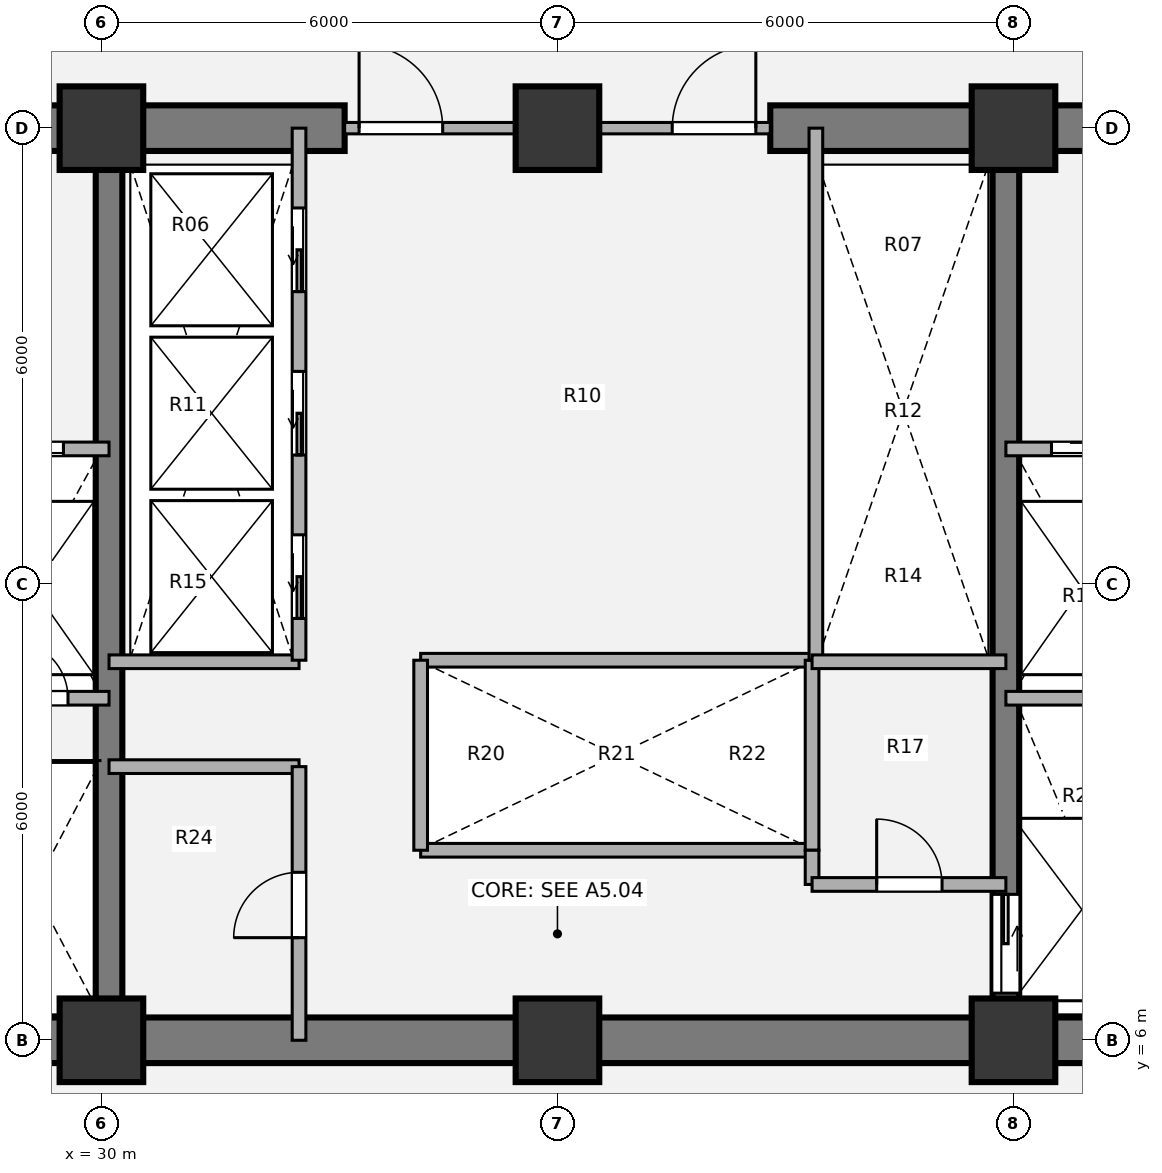
"""IFC4 building model, lengths in metres.
Left out: names, types, materials, properties, quantities, classifications, styles, units other than length and angle.
Written with IfcOpenShell. Run it as: python <this file> out.ifc"""

import sys

from ifc_helpers import new_model, si_unit, direction, frame, frame_2d, origin, origin_2d, place, context, subcontext, project, spatial, rectangle, extrude, source, transform, mapped, element, fill, save


model = new_model("IFC4")
c1 = context("Model", 3, precision=1e-05, world=origin(), true_north=direction((0.0, 1.0)))
c2 = subcontext(c1, "Body", "Model", "MODEL_VIEW")
j1 = project(units=[si_unit("LENGTHUNIT", "METRE"), si_unit("PLANEANGLEUNIT", "RADIAN")], contexts=[c1])
p1 = place(None, origin())
s1 = spatial("IfcSite", under=j1, at=p1, CompositionType="ELEMENT")
p2 = place(p1, origin())
s2 = spatial("IfcBuilding", under=s1, at=p2, CompositionType="ELEMENT")
p3 = place(p2, frame((0.0, 0.0, 57.24)))
s3 = spatial("IfcBuildingStorey", under=s2, at=p3, CompositionType="ELEMENT", Elevation=57.24)
m1 = source(origin(), c2, "Body", "SweptSolid", [
    extrude(rectangle(XDim=1.1, YDim=1.1, at=origin_2d()), origin(), (0.0, 0.0, 1.0), 3.78),
])
for number, where, z_axis, x_axis in (
    (1, (30.0, 6.0, 0.0), (0.0, 0.0, 1.0), (1.0, 0.0, 0.0)),
    (2, (36.0, 6.0, 0.0), (0.0, 0.0, 1.0), (1.0, 0.0, 0.0)),
    (3, (42.0, 6.0, 0.0), (0.0, 0.0, 1.0), (1.0, 0.0, 0.0)),
    (4, (30.0, 18.0, 0.0), (0.0, 0.0, 1.0), (1.0, 0.0, 0.0)),
    (5, (36.0, 18.0, 0.0), (0.0, 0.0, 1.0), (1.0, 0.0, 0.0)),
    (6, (42.0, 18.0, 0.0), (0.0, 0.0, 1.0), (1.0, 0.0, 0.0)),
):
    element("IfcColumn", number, at=place(p3, frame(where, z_axis=z_axis, x_axis=x_axis)), inside=s3, PredefinedType="COLUMN", context=c2, shape_type="MappedRepresentation", body=[
        mapped(m1, transform((0.0, 0.0, 0.0), x_axis=(1.0, 0.0, 0.0), y_axis=(0.0, 1.0, 0.0), z_axis=(0.0, 0.0, 1.0), scale=1.0)),
    ])
p4 = place(p3, frame((48.3, 6.0, 0.0), z_axis=(0.0, 0.0, 1.0), x_axis=(-1.0, 0.0, 0.0)))
e7 = element("IfcWall", 7, at=p4, inside=s3, PredefinedType="SHEAR", context=c2, shape_type="SweptSolid", body=[
    extrude(rectangle(XDim=24.6, YDim=0.6, at=frame_2d((12.3, 0.0))), origin(), (0.0, 0.0, 1.0), 3.78),
])
p5 = place(p3, frame((23.7, 18.0, 0.0), z_axis=(0.0, 0.0, 1.0), x_axis=(1.0, 0.0, 0.0)))
e8 = element("IfcWall", 8, at=p5, inside=s3, PredefinedType="SHEAR", context=c2, shape_type="SweptSolid", body=[
    extrude(rectangle(XDim=9.5, YDim=0.6, at=frame_2d((4.75, 0.0))), origin(), (0.0, 0.0, 1.0), 3.78),
])
p6 = place(p5, frame((2.95, 0.0, 0.0)))
e9 = element("IfcOpeningElement", 9, at=p6, cuts=e8, PredefinedType="OPENING", context=c2, shape_type="SweptSolid", body=[
    extrude(rectangle(XDim=1.1, YDim=2.1, at=origin_2d()), frame((0.55, 0.31, 1.05), z_axis=(0.0, -1.0, 0.0), x_axis=(1.0, 0.0, 0.0)), (0.0, 0.0, 1.0), 0.62),
])
p7 = place(p3, frame((38.8, 18.0, 0.0), z_axis=(0.0, 0.0, 1.0), x_axis=(1.0, 0.0, 0.0)))
e10 = element("IfcWall", 10, at=p7, inside=s3, PredefinedType="SHEAR", context=c2, shape_type="SweptSolid", body=[
    extrude(rectangle(XDim=9.5, YDim=0.6, at=frame_2d((4.75, 0.0))), origin(), (0.0, 0.0, 1.0), 3.78),
])
p8 = place(p7, frame((5.45, 0.0, 0.0)))
e11 = element("IfcOpeningElement", 11, at=p8, cuts=e10, PredefinedType="OPENING", context=c2, shape_type="SweptSolid", body=[
    extrude(rectangle(XDim=1.1, YDim=2.1, at=origin_2d()), frame((0.55, 0.31, 1.05), z_axis=(0.0, -1.0, 0.0), x_axis=(1.0, 0.0, 0.0)), (0.0, 0.0, 1.0), 0.62),
])
p9 = place(p3, frame((30.1, 6.0, 0.0), z_axis=(0.0, 0.0, 1.0), x_axis=(0.0, 1.0, 0.0)))
e12 = element("IfcWall", 12, at=p9, inside=s3, PredefinedType="SHEAR", context=c2, shape_type="SweptSolid", body=[
    extrude(rectangle(XDim=12.0, YDim=0.35, at=frame_2d((6.0, 0.0))), origin(), (0.0, 0.0, 1.0), 3.78),
])
p10 = place(p3, frame((41.9, 18.0, 0.0), z_axis=(0.0, 0.0, 1.0), x_axis=(0.0, -1.0, 0.0)))
e13 = element("IfcWall", 13, at=p10, inside=s3, PredefinedType="SHEAR", context=c2, shape_type="SweptSolid", body=[
    extrude(rectangle(XDim=12.0, YDim=0.35, at=frame_2d((6.0, 0.0))), origin(), (0.0, 0.0, 1.0), 3.78),
])
p11 = place(p10, frame((10.08, 0.0, 0.0)))
e14 = element("IfcOpeningElement", 14, at=p11, cuts=e13, PredefinedType="OPENING", context=c2, shape_type="SweptSolid", body=[
    extrude(rectangle(XDim=1.3, YDim=2.1, at=origin_2d()), frame((0.65, 0.185, 1.05), z_axis=(0.0, -1.0, 0.0), x_axis=(1.0, 0.0, 0.0)), (0.0, 0.0, 1.0), 0.37),
])
for number, where, z_axis, x_axis in (
    (15, (34.2, 11.0, 0.0), (0.0, 0.0, 1.0), (1.0, 0.0, 0.0)),
    (16, (34.2, 8.5, 0.0), (0.0, 0.0, 1.0), (1.0, 0.0, 0.0)),
):
    element("IfcWall", number, at=place(p3, frame(where, z_axis=z_axis, x_axis=x_axis)), inside=s3, PredefinedType="PARTITIONING", context=c2, shape_type="SweptSolid", body=[
        extrude(rectangle(XDim=5.15, YDim=0.18, at=frame_2d((2.575, 0.0))), origin(), (0.0, 0.0, 1.0), 3.5),
    ])
for number, where, z_axis, x_axis in (
    (17, (34.2, 8.5, 0.0), (0.0, 0.0, 1.0), (0.0, 1.0, 0.0)),
    (18, (39.35, 8.5, 0.0), (0.0, 0.0, 1.0), (0.0, 1.0, 0.0)),
):
    element("IfcWall", number, at=place(p3, frame(where, z_axis=z_axis, x_axis=x_axis)), inside=s3, PredefinedType="PARTITIONING", context=c2, shape_type="SweptSolid", body=[
        extrude(rectangle(XDim=2.5, YDim=0.18, at=frame_2d((1.25, 0.0))), origin(), (0.0, 0.0, 1.0), 3.5),
    ])
p12 = place(p3, frame((39.4, 11.0, 0.0), z_axis=(0.0, 0.0, 1.0), x_axis=(0.0, 1.0, 0.0)))
e19 = element("IfcWall", 19, at=p12, inside=s3, PredefinedType="PARTITIONING", context=c2, shape_type="SweptSolid", body=[
    extrude(rectangle(XDim=7.0, YDim=0.18, at=frame_2d((3.5, 0.0))), origin(), (0.0, 0.0, 1.0), 3.5),
])
for number, where, z_axis, x_axis in (
    (20, (30.1, 10.98, 0.0), (0.0, 0.0, 1.0), (1.0, 0.0, 0.0)),
    (21, (30.1, 9.6, 0.0), (0.0, 0.0, 1.0), (1.0, 0.0, 0.0)),
):
    element("IfcWall", number, at=place(p3, frame(where, z_axis=z_axis, x_axis=x_axis)), inside=s3, PredefinedType="PARTITIONING", context=c2, shape_type="SweptSolid", body=[
        extrude(rectangle(XDim=2.5, YDim=0.18, at=frame_2d((1.25, 0.0))), origin(), (0.0, 0.0, 1.0), 3.5),
    ])
p13 = place(p3, frame((32.6, 6.0, 0.0), z_axis=(0.0, 0.0, 1.0), x_axis=(0.0, 1.0, 0.0)))
e22 = element("IfcWall", 22, at=p13, inside=s3, PredefinedType="PARTITIONING", context=c2, shape_type="SweptSolid", body=[
    extrude(rectangle(XDim=3.6, YDim=0.18, at=frame_2d((1.8, 0.0))), origin(), (0.0, 0.0, 1.0), 3.5),
])
p14 = place(p13, frame((1.35, 0.0, 0.0)))
e23 = element("IfcOpeningElement", 23, at=p14, cuts=e22, PredefinedType="OPENING", context=c2, shape_type="SweptSolid", body=[
    extrude(rectangle(XDim=0.86, YDim=2.1, at=origin_2d()), frame((0.43, 0.1, 1.05), z_axis=(0.0, -1.0, 0.0), x_axis=(1.0, 0.0, 0.0)), (0.0, 0.0, 1.0), 0.2),
])
p15 = place(p3, frame((39.35, 10.98, 0.0), z_axis=(0.0, 0.0, 1.0), x_axis=(1.0, 0.0, 0.0)))
e24 = element("IfcWall", 24, at=p15, inside=s3, PredefinedType="PARTITIONING", context=c2, shape_type="SweptSolid", body=[
    extrude(rectangle(XDim=2.55, YDim=0.18, at=frame_2d((1.275, 0.0))), origin(), (0.0, 0.0, 1.0), 3.5),
])
p16 = place(p3, frame((39.35, 8.05, 0.0), z_axis=(0.0, 0.0, 1.0), x_axis=(0.0, 1.0, 0.0)))
e25 = element("IfcWall", 25, at=p16, inside=s3, PredefinedType="PARTITIONING", context=c2, shape_type="SweptSolid", body=[
    extrude(rectangle(XDim=0.45, YDim=0.18, at=frame_2d((0.225, 0.0))), origin(), (0.0, 0.0, 1.0), 3.5),
])
p17 = place(p3, frame((39.35, 8.05, 0.0), z_axis=(0.0, 0.0, 1.0), x_axis=(1.0, 0.0, 0.0)))
e26 = element("IfcWall", 26, at=p17, inside=s3, PredefinedType="PARTITIONING", context=c2, shape_type="SweptSolid", body=[
    extrude(rectangle(XDim=2.55, YDim=0.18, at=frame_2d((1.275, 0.0))), origin(), (0.0, 0.0, 1.0), 3.5),
])
p18 = place(p17, frame((0.85, 0.0, 0.0)))
e27 = element("IfcOpeningElement", 27, at=p18, cuts=e26, PredefinedType="OPENING", context=c2, shape_type="SweptSolid", body=[
    extrude(rectangle(XDim=0.86, YDim=2.1, at=origin_2d()), frame((0.43, 0.1, 1.05), z_axis=(0.0, -1.0, 0.0), x_axis=(1.0, 0.0, 0.0)), (0.0, 0.0, 1.0), 0.2),
])
p19 = place(p3, frame((33.2, 18.0, 0.0), z_axis=(0.0, 0.0, 1.0), x_axis=(1.0, 0.0, 0.0)))
e28 = element("IfcWall", 28, at=p19, inside=s3, PredefinedType="PARTITIONING", context=c2, shape_type="SweptSolid", body=[
    extrude(rectangle(XDim=5.6, YDim=0.15, at=frame_2d((2.8, 0.0))), origin(), (0.0, 0.0, 1.0), 2.315),
])
p20 = place(p19, frame((0.19, 0.0, 0.0)))
e29 = element("IfcOpeningElement", 29, at=p20, cuts=e28, PredefinedType="OPENING", context=c2, shape_type="SweptSolid", body=[
    extrude(rectangle(XDim=1.1, YDim=2.1, at=origin_2d()), frame((0.55, 0.085, 1.05), z_axis=(0.0, -1.0, 0.0), x_axis=(1.0, 0.0, 0.0)), (0.0, 0.0, 1.0), 0.17),
])
p21 = place(p19, frame((4.31, 0.0, 0.0)))
e30 = element("IfcOpeningElement", 30, at=p21, cuts=e28, PredefinedType="OPENING", context=c2, shape_type="SweptSolid", body=[
    extrude(rectangle(XDim=1.1, YDim=2.1, at=origin_2d()), frame((0.55, 0.085, 1.05), z_axis=(0.0, -1.0, 0.0), x_axis=(1.0, 0.0, 0.0)), (0.0, 0.0, 1.0), 0.17),
])
p22 = place(p3, frame((24.0, 13.78, 0.0), z_axis=(0.0, 0.0, 1.0), x_axis=(1.0, 0.0, 0.0)))
e31 = element("IfcWall", 31, at=p22, inside=s3, PredefinedType="PARTITIONING", context=c2, shape_type="SweptSolid", body=[
    extrude(rectangle(XDim=6.1, YDim=0.18, at=frame_2d((3.05, 0.0))), origin(), (0.0, 0.0, 1.0), 3.5),
])
p23 = place(p22, frame((1.15, 0.0, 0.0)))
e32 = element("IfcOpeningElement", 32, at=p23, cuts=e31, PredefinedType="OPENING", context=c2, shape_type="SweptSolid", body=[
    extrude(rectangle(XDim=1.1, YDim=2.1, at=origin_2d()), frame((0.55, 0.1, 1.05), z_axis=(0.0, -1.0, 0.0), x_axis=(1.0, 0.0, 0.0)), (0.0, 0.0, 1.0), 0.2),
])
p24 = place(p22, frame((4.4, 0.0, 0.0)))
e33 = element("IfcOpeningElement", 33, at=p24, cuts=e31, PredefinedType="OPENING", context=c2, shape_type="SweptSolid", body=[
    extrude(rectangle(XDim=1.1, YDim=2.1, at=origin_2d()), frame((0.55, 0.1, 1.05), z_axis=(0.0, -1.0, 0.0), x_axis=(1.0, 0.0, 0.0)), (0.0, 0.0, 1.0), 0.2),
])
p25 = place(p3, frame((28.15, 10.5, 0.0), z_axis=(0.0, 0.0, 1.0), x_axis=(1.0, 0.0, 0.0)))
e34 = element("IfcWall", 34, at=p25, inside=s3, PredefinedType="PARTITIONING", context=c2, shape_type="SweptSolid", body=[
    extrude(rectangle(XDim=1.95, YDim=0.18, at=frame_2d((0.975, 0.0))), origin(), (0.0, 0.0, 1.0), 3.5),
])
p26 = place(p25, frame((0.65, 0.0, 0.0)))
e35 = element("IfcOpeningElement", 35, at=p26, cuts=e34, PredefinedType="OPENING", context=c2, shape_type="SweptSolid", body=[
    extrude(rectangle(XDim=0.76, YDim=2.05, at=origin_2d()), frame((0.38, 0.1, 1.025), z_axis=(0.0, -1.0, 0.0), x_axis=(1.0, 0.0, 0.0)), (0.0, 0.0, 1.0), 0.2),
])
p27 = place(p3, frame((41.9, 13.78, 0.0), z_axis=(0.0, 0.0, 1.0), x_axis=(1.0, 0.0, 0.0)))
e36 = element("IfcWall", 36, at=p27, inside=s3, PredefinedType="PARTITIONING", context=c2, shape_type="SweptSolid", body=[
    extrude(rectangle(XDim=6.1, YDim=0.18, at=frame_2d((3.05, 0.0))), origin(), (0.0, 0.0, 1.0), 3.5),
])
p28 = place(p27, frame((0.6, 0.0, 0.0)))
e37 = element("IfcOpeningElement", 37, at=p28, cuts=e36, PredefinedType="OPENING", context=c2, shape_type="SweptSolid", body=[
    extrude(rectangle(XDim=1.1, YDim=2.1, at=origin_2d()), frame((0.55, 0.1, 1.05), z_axis=(0.0, -1.0, 0.0), x_axis=(1.0, 0.0, 0.0)), (0.0, 0.0, 1.0), 0.2),
])
p29 = place(p27, frame((3.8, 0.0, 0.0)))
e38 = element("IfcOpeningElement", 38, at=p29, cuts=e36, PredefinedType="OPENING", context=c2, shape_type="SweptSolid", body=[
    extrude(rectangle(XDim=1.1, YDim=2.1, at=origin_2d()), frame((0.55, 0.1, 1.05), z_axis=(0.0, -1.0, 0.0), x_axis=(1.0, 0.0, 0.0)), (0.0, 0.0, 1.0), 0.2),
])
p30 = place(p3, frame((41.9, 10.5, 0.0), z_axis=(0.0, 0.0, 1.0), x_axis=(1.0, 0.0, 0.0)))
e39 = element("IfcWall", 39, at=p30, inside=s3, PredefinedType="PARTITIONING", context=c2, shape_type="SweptSolid", body=[
    extrude(rectangle(XDim=1.95, YDim=0.18, at=frame_2d((0.975, 0.0))), origin(), (0.0, 0.0, 1.0), 3.5),
])
p31 = place(p3, frame((32.6, 11.0, 0.0), z_axis=(0.0, 0.0, 1.0), x_axis=(0.0, 1.0, 0.0)))
e40 = element("IfcWall", 40, at=p31, inside=s3, PredefinedType="PARTITIONING", context=c2, shape_type="SweptSolid", body=[
    extrude(rectangle(XDim=7.0, YDim=0.18, at=frame_2d((3.5, 0.0))), origin(), (0.0, 0.0, 1.0), 3.5),
])
p32 = place(p31, frame((0.55, 0.0, 0.0)))
e41 = element("IfcOpeningElement", 41, at=p32, cuts=e40, PredefinedType="OPENING", context=c2, shape_type="SweptSolid", body=[
    extrude(rectangle(XDim=1.1, YDim=2.1, at=origin_2d()), frame((0.55, 0.1, 1.05), z_axis=(0.0, -1.0, 0.0), x_axis=(1.0, 0.0, 0.0)), (0.0, 0.0, 1.0), 0.2),
])
p33 = place(p31, frame((2.7, 0.0, 0.0)))
e42 = element("IfcOpeningElement", 42, at=p33, cuts=e40, PredefinedType="OPENING", context=c2, shape_type="SweptSolid", body=[
    extrude(rectangle(XDim=1.1, YDim=2.1, at=origin_2d()), frame((0.55, 0.1, 1.05), z_axis=(0.0, -1.0, 0.0), x_axis=(1.0, 0.0, 0.0)), (0.0, 0.0, 1.0), 0.2),
])
p34 = place(p31, frame((4.85, 0.0, 0.0)))
e43 = element("IfcOpeningElement", 43, at=p34, cuts=e40, PredefinedType="OPENING", context=c2, shape_type="SweptSolid", body=[
    extrude(rectangle(XDim=1.1, YDim=2.1, at=origin_2d()), frame((0.55, 0.1, 1.05), z_axis=(0.0, -1.0, 0.0), x_axis=(1.0, 0.0, 0.0)), (0.0, 0.0, 1.0), 0.2),
])
m2 = source(origin(), c2, "Body", "SweptSolid", [
    extrude(rectangle(XDim=0.86, YDim=2.1, at=origin_2d()), frame((0.43, 0.025, 1.05), z_axis=(0.0, -1.0, 0.0), x_axis=(1.0, 0.0, 0.0)), (0.0, 0.0, 1.0), 0.05),
])
p35 = place(p14, origin())
e44 = element("IfcDoor", 44, at=p35, inside=s3, OperationType="SINGLE_SWING_LEFT", PredefinedType="DOOR", context=c2, shape_type="MappedRepresentation", body=[
    mapped(m2, transform((0.0, 0.0, 0.0), x_axis=(1.0, 0.0, 0.0), y_axis=(0.0, 1.0, 0.0), z_axis=(0.0, 0.0, 1.0), scale=1.0)),
])
fill(e23, e44)
p36 = place(p18, origin())
e45 = element("IfcDoor", 45, at=p36, inside=s3, OperationType="SINGLE_SWING_LEFT", PredefinedType="DOOR", context=c2, shape_type="MappedRepresentation", body=[
    mapped(m2, transform((0.0, 0.0, 0.0), x_axis=(1.0, 0.0, 0.0), y_axis=(0.0, 1.0, 0.0), z_axis=(0.0, 0.0, 1.0), scale=1.0)),
])
fill(e27, e45)
m3 = source(origin(), c2, "Body", "SweptSolid", [
    extrude(rectangle(XDim=1.1, YDim=2.1, at=origin_2d()), frame((0.55, 0.025, 1.05), z_axis=(0.0, -1.0, 0.0), x_axis=(1.0, 0.0, 0.0)), (0.0, 0.0, 1.0), 0.05),
])
p37 = place(p20, origin())
e46 = element("IfcDoor", 46, at=p37, inside=s3, OperationType="SINGLE_SWING_LEFT", PredefinedType="DOOR", context=c2, shape_type="MappedRepresentation", body=[
    mapped(m3, transform((0.0, 0.0, 0.0), x_axis=(1.0, 0.0, 0.0), y_axis=(0.0, 1.0, 0.0), z_axis=(0.0, 0.0, 1.0), scale=1.0)),
])
fill(e29, e46)
p38 = place(p21, origin())
e47 = element("IfcDoor", 47, at=p38, inside=s3, OperationType="SINGLE_SWING_RIGHT", PredefinedType="DOOR", context=c2, shape_type="MappedRepresentation", body=[
    mapped(m3, transform((0.0, 0.0, 0.0), x_axis=(1.0, 0.0, 0.0), y_axis=(0.0, 1.0, 0.0), z_axis=(0.0, 0.0, 1.0), scale=1.0)),
])
fill(e30, e47)
m4 = source(origin(), c2, "Body", "SweptSolid", [
    extrude(rectangle(XDim=1.1, YDim=2.1, at=origin_2d()), frame((0.55, 0.025, 1.05), z_axis=(0.0, -1.0, 0.0), x_axis=(1.0, 0.0, 0.0)), (0.0, 0.0, 1.0), 0.05),
])
p39 = place(p24, origin())
e48 = element("IfcDoor", 48, at=p39, inside=s3, OperationType="SLIDING_TO_LEFT", PredefinedType="DOOR", context=c2, shape_type="MappedRepresentation", body=[
    mapped(m4, transform((0.0, 0.0, 0.0), x_axis=(1.0, 0.0, 0.0), y_axis=(0.0, 1.0, 0.0), z_axis=(0.0, 0.0, 1.0), scale=1.0)),
])
fill(e33, e48)
m5 = source(origin(), c2, "Body", "SweptSolid", [
    extrude(rectangle(XDim=0.76, YDim=2.05, at=origin_2d()), frame((0.38, 0.025, 1.025), z_axis=(0.0, -1.0, 0.0), x_axis=(1.0, 0.0, 0.0)), (0.0, 0.0, 1.0), 0.05),
])
p40 = place(p26, origin())
e49 = element("IfcDoor", 49, at=p40, inside=s3, OperationType="SINGLE_SWING_LEFT", PredefinedType="DOOR", context=c2, shape_type="MappedRepresentation", body=[
    mapped(m5, transform((0.0, 0.0, 0.0), x_axis=(1.0, 0.0, 0.0), y_axis=(0.0, 1.0, 0.0), z_axis=(0.0, 0.0, 1.0), scale=1.0)),
])
fill(e35, e49)
p41 = place(p28, origin())
e50 = element("IfcDoor", 50, at=p41, inside=s3, OperationType="SLIDING_TO_RIGHT", PredefinedType="DOOR", context=c2, shape_type="MappedRepresentation", body=[
    mapped(m4, transform((0.0, 0.0, 0.0), x_axis=(1.0, 0.0, 0.0), y_axis=(0.0, 1.0, 0.0), z_axis=(0.0, 0.0, 1.0), scale=1.0)),
])
fill(e37, e50)
m6 = source(origin(), c2, "Body", "SweptSolid", [
    extrude(rectangle(XDim=1.3, YDim=2.1, at=origin_2d()), frame((0.65, 0.025, 1.05), z_axis=(0.0, -1.0, 0.0), x_axis=(1.0, 0.0, 0.0)), (0.0, 0.0, 1.0), 0.05),
])
p42 = place(p11, origin())
e51 = element("IfcDoor", 51, at=p42, inside=s3, OperationType="SLIDING_TO_LEFT", PredefinedType="DOOR", context=c2, shape_type="MappedRepresentation", body=[
    mapped(m6, transform((0.0, 0.0, 0.0), x_axis=(1.0, 0.0, 0.0), y_axis=(0.0, 1.0, 0.0), z_axis=(0.0, 0.0, 1.0), scale=1.0)),
])
fill(e14, e51)
p43 = place(p32, origin())
e52 = element("IfcDoor", 52, at=p43, inside=s3, OperationType="SLIDING_TO_LEFT", PredefinedType="DOOR", context=c2, shape_type="MappedRepresentation", body=[
    mapped(m4, transform((0.0, 0.0, 0.0), x_axis=(1.0, 0.0, 0.0), y_axis=(0.0, 1.0, 0.0), z_axis=(0.0, 0.0, 1.0), scale=1.0)),
])
fill(e41, e52)
p44 = place(p33, origin())
e53 = element("IfcDoor", 53, at=p44, inside=s3, OperationType="SLIDING_TO_LEFT", PredefinedType="DOOR", context=c2, shape_type="MappedRepresentation", body=[
    mapped(m4, transform((0.0, 0.0, 0.0), x_axis=(1.0, 0.0, 0.0), y_axis=(0.0, 1.0, 0.0), z_axis=(0.0, 0.0, 1.0), scale=1.0)),
])
fill(e42, e53)
p45 = place(p34, origin())
e54 = element("IfcDoor", 54, at=p45, inside=s3, OperationType="SLIDING_TO_LEFT", PredefinedType="DOOR", context=c2, shape_type="MappedRepresentation", body=[
    mapped(m4, transform((0.0, 0.0, 0.0), x_axis=(1.0, 0.0, 0.0), y_axis=(0.0, 1.0, 0.0), z_axis=(0.0, 0.0, 1.0), scale=1.0)),
])
fill(e43, e54)
save(model, sys.argv[1])
